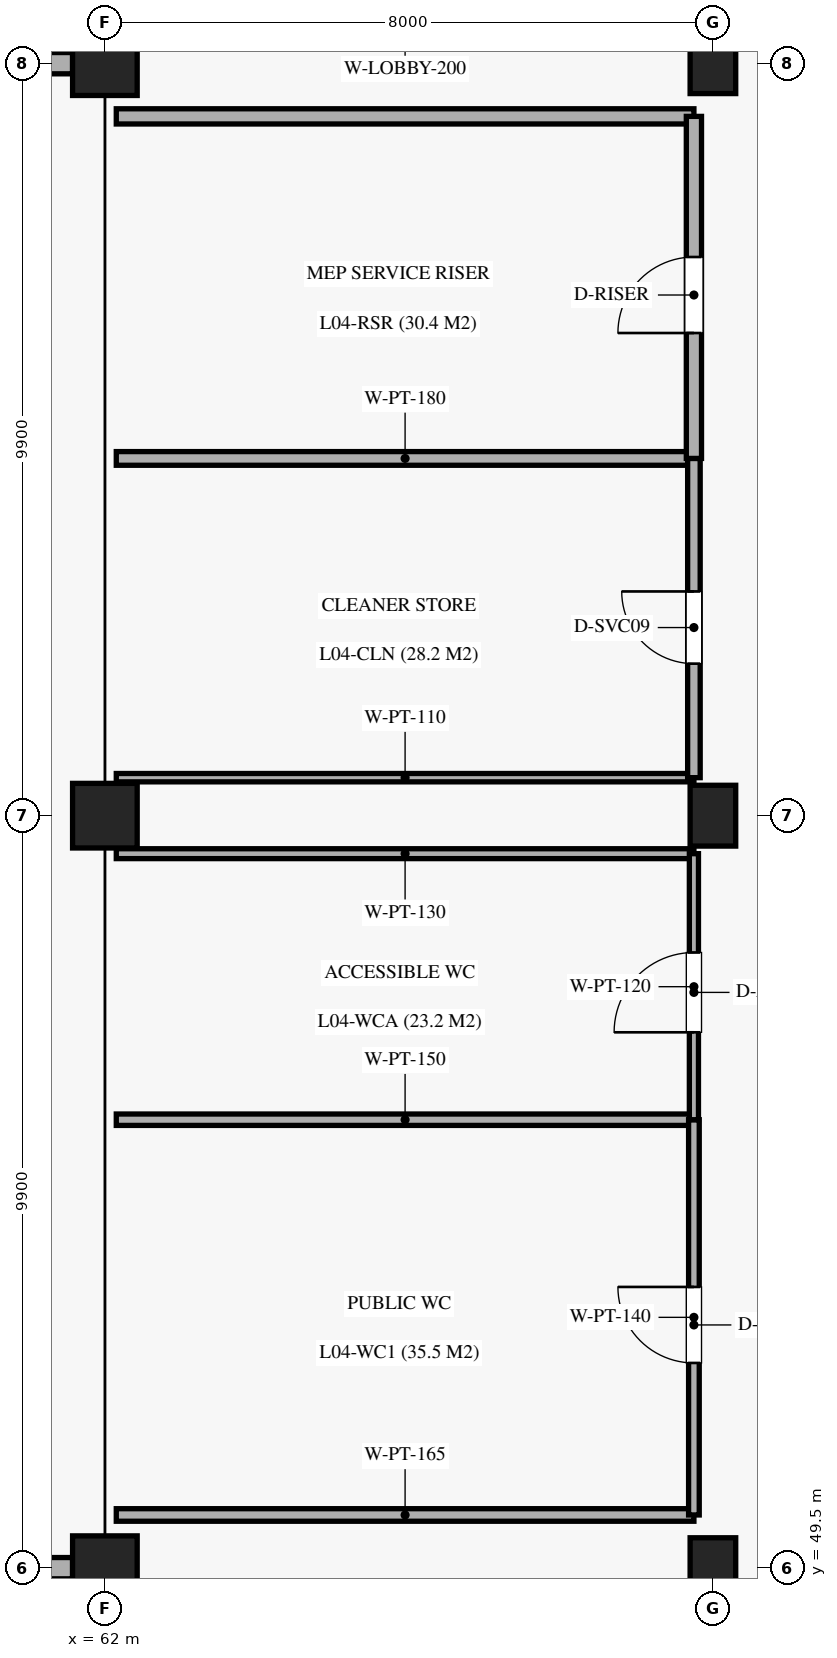
"""IFC4 building model, lengths in metres.
Left out: names, types, materials, properties, quantities, classifications, styles, units other than length and angle.
Written with IfcOpenShell. Run it as: python <this file> out.ifc"""

import sys

from ifc_helpers import new_model, si_unit, direction, frame, frame_2d, origin, origin_2d, place, context, subcontext, project, spatial, rectangle, extrude, element, fill, save


model = new_model("IFC4")
c1 = context("Model", 3, precision=1e-05, world=origin(), true_north=direction((0.0, 1.0)))
c2 = subcontext(c1, "Body", "Model", "MODEL_VIEW")
j1 = project(units=[si_unit("LENGTHUNIT", "METRE"), si_unit("PLANEANGLEUNIT", "RADIAN")], contexts=[c1])
p1 = place(None, origin())
s1 = spatial("IfcSite", under=j1, at=p1, CompositionType="ELEMENT")
p2 = place(p1, origin())
s2 = spatial("IfcBuilding", under=s1, at=p2, CompositionType="ELEMENT")
p3 = place(p2, frame((0.0, 0.0, 22.44)))
s3 = spatial("IfcBuildingStorey", under=s2, at=p3, CompositionType="ELEMENT", Elevation=22.44)
for number, where, z_axis, x_axis in (
    (1, (62.0, 49.5, 0.0), (0.0, 0.0, 1.0), (1.0, 0.0, 0.0)),
    (2, (62.0, 59.4, 0.0), (0.0, 0.0, 1.0), (1.0, 0.0, 0.0)),
    (3, (62.0, 69.3, 0.0), (0.0, 0.0, 1.0), (1.0, 0.0, 0.0)),
):
    element("IfcColumn", number, at=place(p3, frame(where, z_axis=z_axis, x_axis=x_axis)), inside=s3, PredefinedType="COLUMN", context=c2, shape_type="SweptSolid", body=[
        extrude(rectangle(XDim=0.85, YDim=0.85, at=origin_2d()), origin(), (0.0, 0.0, 1.0), 6.12),
    ])
for number, where, z_axis, x_axis in (
    (4, (70.0, 49.5, 0.0), (0.0, 0.0, 1.0), (1.0, 0.0, 0.0)),
    (5, (70.0, 59.4, 0.0), (0.0, 0.0, 1.0), (1.0, 0.0, 0.0)),
    (6, (70.0, 69.3, 0.0), (0.0, 0.0, 1.0), (1.0, 0.0, 0.0)),
):
    element("IfcColumn", number, at=place(p3, frame(where, z_axis=z_axis, x_axis=x_axis)), inside=s3, PredefinedType="COLUMN", context=c2, shape_type="SweptSolid", body=[
        extrude(rectangle(XDim=0.6, YDim=0.8, at=origin_2d()), origin(), (0.0, 0.0, 1.0), 6.12),
    ])
p4 = place(p3, frame((61.575, 69.3, 0.0), z_axis=(0.0, 0.0, 1.0), x_axis=(-1.0, 0.0, 0.0)))
e7 = element("IfcWall", 7, at=p4, inside=s3, PredefinedType="SOLIDWALL", context=c2, shape_type="SweptSolid", body=[
    extrude(rectangle(XDim=1.525, YDim=0.28, at=frame_2d((0.762, 0.0))), origin(), (0.0, 0.0, 1.0), 5.06),
])
p5 = place(p3, frame((58.1, 49.5, 0.0), z_axis=(0.0, 0.0, 1.0), x_axis=(1.0, 0.0, 0.0)))
e8 = element("IfcWall", 8, at=p5, inside=s3, PredefinedType="SOLIDWALL", context=c2, shape_type="SweptSolid", body=[
    extrude(rectangle(XDim=3.475, YDim=0.28, at=frame_2d((1.737, 0.0))), origin(), (0.0, 0.0, 1.0), 5.06),
])
p6 = place(p3, frame((62.15, 50.2, 0.0), z_axis=(0.0, 0.0, 1.0), x_axis=(1.0, 0.0, 0.0)))
e9 = element("IfcWall", 9, at=p6, inside=s3, PredefinedType="PARTITIONING", context=c2, shape_type="SweptSolid", body=[
    extrude(rectangle(XDim=7.6, YDim=0.165, at=frame_2d((3.8, 0.0))), origin(), (0.0, 0.0, 1.0), 4.96),
])
p7 = place(p3, frame((62.15, 55.4, 0.0), z_axis=(0.0, 0.0, 1.0), x_axis=(1.0, 0.0, 0.0)))
e10 = element("IfcWall", 10, at=p7, inside=s3, PredefinedType="PARTITIONING", context=c2, shape_type="SweptSolid", body=[
    extrude(rectangle(XDim=7.6, YDim=0.15, at=frame_2d((3.8, 0.0))), origin(), (0.0, 0.0, 1.0), 4.96),
])
p8 = place(p3, frame((69.75, 50.2, 0.0), z_axis=(0.0, 0.0, 1.0), x_axis=(0.0, 1.0, 0.0)))
e11 = element("IfcWall", 11, at=p8, inside=s3, PredefinedType="PARTITIONING", context=c2, shape_type="SweptSolid", body=[
    extrude(rectangle(XDim=5.2, YDim=0.14, at=frame_2d((2.6, 0.0))), origin(), (0.0, 0.0, 1.0), 4.96),
])
p9 = place(p8, frame((2.0, 0.0, 0.0)))
e12 = element("IfcOpeningElement", 12, at=p9, cuts=e11, PredefinedType="OPENING", context=c2, shape_type="SweptSolid", body=[
    extrude(rectangle(XDim=1.0, YDim=2.1, at=frame_2d((0.5, 1.05))), frame((0.0, 0.08, 0.0), z_axis=(0.0, -1.0, 0.0), x_axis=(1.0, 0.0, 0.0)), (0.0, 0.0, 1.0), 0.16),
])
p10 = place(p3, frame((62.15, 58.9, 0.0), z_axis=(0.0, 0.0, 1.0), x_axis=(1.0, 0.0, 0.0)))
e13 = element("IfcWall", 13, at=p10, inside=s3, PredefinedType="PARTITIONING", context=c2, shape_type="SweptSolid", body=[
    extrude(rectangle(XDim=7.6, YDim=0.13, at=frame_2d((3.8, 0.0))), origin(), (0.0, 0.0, 1.0), 4.96),
])
p11 = place(p3, frame((69.75, 55.4, 0.0), z_axis=(0.0, 0.0, 1.0), x_axis=(0.0, 1.0, 0.0)))
e14 = element("IfcWall", 14, at=p11, inside=s3, PredefinedType="PARTITIONING", context=c2, shape_type="SweptSolid", body=[
    extrude(rectangle(XDim=3.5, YDim=0.12, at=frame_2d((1.75, 0.0))), origin(), (0.0, 0.0, 1.0), 4.96),
])
p12 = place(p11, frame((1.15, 0.0, 0.0)))
e15 = element("IfcOpeningElement", 15, at=p12, cuts=e14, PredefinedType="OPENING", context=c2, shape_type="SweptSolid", body=[
    extrude(rectangle(XDim=1.05, YDim=2.15, at=frame_2d((0.525, 1.075))), frame((0.0, 0.07, 0.0), z_axis=(0.0, -1.0, 0.0), x_axis=(1.0, 0.0, 0.0)), (0.0, 0.0, 1.0), 0.14),
])
p13 = place(p3, frame((62.15, 59.9, 0.0), z_axis=(0.0, 0.0, 1.0), x_axis=(1.0, 0.0, 0.0)))
e16 = element("IfcWall", 16, at=p13, inside=s3, PredefinedType="PARTITIONING", context=c2, shape_type="SweptSolid", body=[
    extrude(rectangle(XDim=7.6, YDim=0.11, at=frame_2d((3.8, 0.0))), origin(), (0.0, 0.0, 1.0), 4.96),
])
p14 = place(p3, frame((62.15, 64.1, 0.0), z_axis=(0.0, 0.0, 1.0), x_axis=(1.0, 0.0, 0.0)))
e17 = element("IfcWall", 17, at=p14, inside=s3, PredefinedType="PARTITIONING", context=c2, shape_type="SweptSolid", body=[
    extrude(rectangle(XDim=7.6, YDim=0.18, at=frame_2d((3.8, 0.0))), origin(), (0.0, 0.0, 1.0), 4.96),
])
p15 = place(p3, frame((69.75, 59.9, 0.0), z_axis=(0.0, 0.0, 1.0), x_axis=(0.0, 1.0, 0.0)))
e18 = element("IfcWall", 18, at=p15, inside=s3, PredefinedType="PARTITIONING", context=c2, shape_type="SweptSolid", body=[
    extrude(rectangle(XDim=4.2, YDim=0.165, at=frame_2d((2.1, 0.0))), origin(), (0.0, 0.0, 1.0), 4.96),
])
p16 = place(p15, frame((1.5, 0.0, 0.0)))
e19 = element("IfcOpeningElement", 19, at=p16, cuts=e18, PredefinedType="OPENING", context=c2, shape_type="SweptSolid", body=[
    extrude(rectangle(XDim=0.95, YDim=2.1, at=frame_2d((0.475, 1.05))), frame((0.0, 0.093, 0.0), z_axis=(0.0, -1.0, 0.0), x_axis=(1.0, 0.0, 0.0)), (0.0, 0.0, 1.0), 0.185),
])
p17 = place(p3, frame((62.15, 68.6, 0.0), z_axis=(0.0, 0.0, 1.0), x_axis=(1.0, 0.0, 0.0)))
e20 = element("IfcWall", 20, at=p17, inside=s3, PredefinedType="SOLIDWALL", context=c2, shape_type="SweptSolid", body=[
    extrude(rectangle(XDim=7.6, YDim=0.2, at=frame_2d((3.8, 0.0))), origin(), (0.0, 0.0, 1.0), 4.96),
])
p18 = place(p3, frame((69.75, 64.1, 0.0), z_axis=(0.0, 0.0, 1.0), x_axis=(0.0, 1.0, 0.0)))
e21 = element("IfcWall", 21, at=p18, inside=s3, PredefinedType="SOLIDWALL", context=c2, shape_type="SweptSolid", body=[
    extrude(rectangle(XDim=4.5, YDim=0.2, at=frame_2d((2.25, 0.0))), origin(), (0.0, 0.0, 1.0), 4.96),
])
p19 = place(p18, frame((1.65, 0.0, 0.0)))
e22 = element("IfcOpeningElement", 22, at=p19, cuts=e21, PredefinedType="OPENING", context=c2, shape_type="SweptSolid", body=[
    extrude(rectangle(XDim=1.0, YDim=2.15, at=frame_2d((0.5, 1.075))), frame((0.0, 0.11, 0.0), z_axis=(0.0, -1.0, 0.0), x_axis=(1.0, 0.0, 0.0)), (0.0, 0.0, 1.0), 0.22),
])
p20 = place(p9, origin())
e23 = element("IfcDoor", 23, at=p20, inside=s3, OperationType="SINGLE_SWING_RIGHT", PredefinedType="DOOR", context=c2, shape_type="SweptSolid", body=[
    extrude(rectangle(XDim=1.0, YDim=2.1, at=frame_2d((0.5, 1.05))), frame((0.0, 0.025, 0.0), z_axis=(0.0, -1.0, 0.0), x_axis=(1.0, 0.0, 0.0)), (0.0, 0.0, 1.0), 0.05),
])
fill(e12, e23)
p21 = place(p12, origin())
e24 = element("IfcDoor", 24, at=p21, inside=s3, OperationType="SINGLE_SWING_LEFT", PredefinedType="DOOR", context=c2, shape_type="SweptSolid", body=[
    extrude(rectangle(XDim=1.05, YDim=2.15, at=frame_2d((0.525, 1.075))), frame((0.0, 0.025, 0.0), z_axis=(0.0, -1.0, 0.0), x_axis=(1.0, 0.0, 0.0)), (0.0, 0.0, 1.0), 0.05),
])
fill(e15, e24)
p22 = place(p16, origin())
e25 = element("IfcDoor", 25, at=p22, inside=s3, OperationType="SINGLE_SWING_RIGHT", PredefinedType="DOOR", context=c2, shape_type="SweptSolid", body=[
    extrude(rectangle(XDim=0.95, YDim=2.1, at=frame_2d((0.475, 1.05))), frame((0.0, 0.025, 0.0), z_axis=(0.0, -1.0, 0.0), x_axis=(1.0, 0.0, 0.0)), (0.0, 0.0, 1.0), 0.05),
])
fill(e19, e25)
p23 = place(p19, origin())
e26 = element("IfcDoor", 26, at=p23, inside=s3, OperationType="SINGLE_SWING_LEFT", PredefinedType="DOOR", context=c2, shape_type="SweptSolid", body=[
    extrude(rectangle(XDim=1.0, YDim=2.15, at=frame_2d((0.5, 1.075))), frame((0.0, 0.025, 0.0), z_axis=(0.0, -1.0, 0.0), x_axis=(1.0, 0.0, 0.0)), (0.0, 0.0, 1.0), 0.05),
])
fill(e22, e26)
save(model, sys.argv[1])
